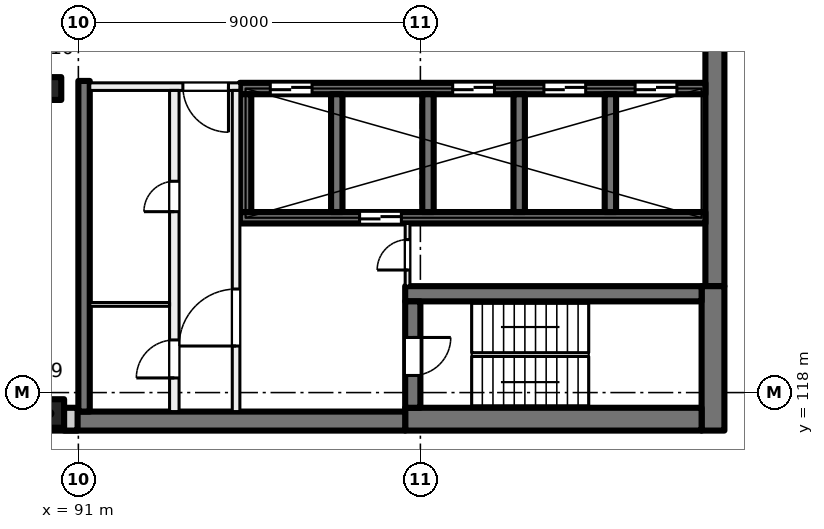
"""IFC4 building model, lengths in metres.
Left out: names, types, materials, properties, quantities, classifications, styles, units other than length and angle.
Written with IfcOpenShell. Run it as: python <this file> out.ifc"""

import sys

from ifc_helpers import new_model, si_unit, direction, frame, frame_2d, origin, origin_2d, place, context, subcontext, project, spatial, rectangle, extrude, element, fill, save


model = new_model("IFC4")
c1 = context("Model", 3, precision=1e-05, world=origin(), true_north=direction((0.0, 1.0)))
c2 = subcontext(c1, "Body", "Model", "MODEL_VIEW")
j1 = project(units=[si_unit("LENGTHUNIT", "METRE"), si_unit("PLANEANGLEUNIT", "RADIAN")], contexts=[c1])
p1 = place(None, origin())
s1 = spatial("IfcSite", under=j1, at=p1, CompositionType="ELEMENT")
p2 = place(p1, origin())
s2 = spatial("IfcBuilding", under=s1, at=p2, CompositionType="ELEMENT")
p3 = place(p2, frame((0.0, 0.0, 212.0)))
s3 = spatial("IfcBuildingStorey", under=s2, at=p3, CompositionType="ELEMENT", Elevation=212.0)
p4 = place(p3, frame((90.25, 126.0, 0.0), z_axis=(0.0, 0.0, 1.0), x_axis=(1.0, 0.0, 0.0)))
e1 = element("IfcColumn", 1, at=p4, inside=s3, PredefinedType="COLUMN", context=c2, shape_type="SweptSolid", body=[
    extrude(rectangle(XDim=0.6, YDim=0.6, at=origin_2d()), origin(), (0.0, 0.0, 1.0), 4.0),
])
p5 = place(p3, frame((90.25, 117.45, 0.0), z_axis=(0.0, 0.0, 1.0), x_axis=(1.0, 0.0, 0.0)))
e2 = element("IfcColumn", 2, at=p5, inside=s3, PredefinedType="COLUMN", context=c2, shape_type="SweptSolid", body=[
    extrude(rectangle(XDim=0.75, YDim=0.75, at=origin_2d()), origin(), (0.0, 0.0, 1.0), 4.0),
])
p6 = place(p3, frame((107.75, 135.2, 0.0), z_axis=(0.0, 0.0, 1.0), x_axis=(0.0, -1.0, 0.0)))
e3 = element("IfcWall", 3, at=p6, inside=s3, PredefinedType="SHEAR", context=c2, shape_type="SweptSolid", body=[
    extrude(rectangle(XDim=14.4, YDim=0.5, at=frame_2d((7.2, 0.0))), origin(), (0.0, 0.0, 1.0), 4.0),
])
p7 = place(p3, frame((107.7, 120.8, 0.0), z_axis=(0.0, 0.0, 1.0), x_axis=(0.0, -1.0, 0.0)))
e4 = element("IfcWall", 4, at=p7, inside=s3, PredefinedType="SHEAR", context=c2, shape_type="SweptSolid", body=[
    extrude(rectangle(XDim=3.8, YDim=0.6, at=frame_2d((1.9, 0.0))), origin(), (0.0, 0.0, 1.0), 4.0),
])
p8 = place(p3, frame((107.4, 117.3, 0.0), z_axis=(0.0, 0.0, 1.0), x_axis=(-1.0, 0.0, 0.0)))
e5 = element("IfcWall", 5, at=p8, inside=s3, PredefinedType="SHEAR", context=c2, shape_type="SweptSolid", body=[
    extrude(rectangle(XDim=7.8, YDim=0.6, at=frame_2d((3.9, 0.0))), origin(), (0.0, 0.0, 1.0), 4.0),
])
p9 = place(p3, frame((99.6, 117.25, 0.0), z_axis=(0.0, 0.0, 1.0), x_axis=(-1.0, 0.0, 0.0)))
e6 = element("IfcWall", 6, at=p9, inside=s3, PredefinedType="SHEAR", context=c2, shape_type="SweptSolid", body=[
    extrude(rectangle(XDim=8.975, YDim=0.5, at=frame_2d((4.488, 0.0))), origin(), (0.0, 0.0, 1.0), 4.0),
])
p10 = place(p3, frame((107.4, 120.6, 0.0), z_axis=(0.0, 0.0, 1.0), x_axis=(-1.0, 0.0, 0.0)))
e7 = element("IfcWall", 7, at=p10, inside=s3, PredefinedType="SHEAR", context=c2, shape_type="SweptSolid", body=[
    extrude(rectangle(XDim=7.8, YDim=0.4, at=frame_2d((3.9, 0.0))), origin(), (0.0, 0.0, 1.0), 4.0),
])
p11 = place(p3, frame((99.8, 120.4, 0.0), z_axis=(0.0, 0.0, 1.0), x_axis=(0.0, -1.0, 0.0)))
e8 = element("IfcWall", 8, at=p11, inside=s3, PredefinedType="SHEAR", context=c2, shape_type="SweptSolid", body=[
    extrude(rectangle(XDim=2.8, YDim=0.4, at=frame_2d((1.4, 0.0))), origin(), (0.0, 0.0, 1.0), 4.0),
])
p12 = place(p11, frame((0.95, 0.0, 0.0)))
e9 = element("IfcOpeningElement", 9, at=p12, cuts=e8, PredefinedType="OPENING", context=c2, shape_type="SweptSolid", body=[
    extrude(rectangle(XDim=1.0, YDim=2.1, at=frame_2d((0.5, 1.05))), frame((0.0, 0.21, 0.0), z_axis=(0.0, -1.0, 0.0), x_axis=(1.0, 0.0, 0.0)), (0.0, 0.0, 1.0), 0.42),
])
p13 = place(p3, frame((107.5, 126.0, 0.0), z_axis=(0.0, 0.0, 1.0), x_axis=(-1.0, 0.0, 0.0)))
e10 = element("IfcWall", 10, at=p13, inside=s3, PredefinedType="SHEAR", context=c2, shape_type="SweptSolid", body=[
    extrude(rectangle(XDim=12.25, YDim=0.3, at=frame_2d((6.125, 0.0))), origin(), (0.0, 0.0, 1.0), 4.0),
])
p14 = place(p13, frame((0.75, 0.0, 0.0)))
e11 = element("IfcOpeningElement", 11, at=p14, cuts=e10, PredefinedType="OPENING", context=c2, shape_type="SweptSolid", body=[
    extrude(rectangle(XDim=1.1, YDim=2.1, at=frame_2d((0.55, 1.05))), frame((0.0, 0.16, 0.0), z_axis=(0.0, -1.0, 0.0), x_axis=(1.0, 0.0, 0.0)), (0.0, 0.0, 1.0), 0.32),
])
p15 = place(p13, frame((3.15, 0.0, 0.0)))
e12 = element("IfcOpeningElement", 12, at=p15, cuts=e10, PredefinedType="OPENING", context=c2, shape_type="SweptSolid", body=[
    extrude(rectangle(XDim=1.1, YDim=2.1, at=frame_2d((0.55, 1.05))), frame((0.0, 0.16, 0.0), z_axis=(0.0, -1.0, 0.0), x_axis=(1.0, 0.0, 0.0)), (0.0, 0.0, 1.0), 0.32),
])
p16 = place(p13, frame((5.55, 0.0, 0.0)))
e13 = element("IfcOpeningElement", 13, at=p16, cuts=e10, PredefinedType="OPENING", context=c2, shape_type="SweptSolid", body=[
    extrude(rectangle(XDim=1.1, YDim=2.1, at=frame_2d((0.55, 1.05))), frame((0.0, 0.16, 0.0), z_axis=(0.0, -1.0, 0.0), x_axis=(1.0, 0.0, 0.0)), (0.0, 0.0, 1.0), 0.32),
])
p17 = place(p13, frame((10.35, 0.0, 0.0)))
e14 = element("IfcOpeningElement", 14, at=p17, cuts=e10, PredefinedType="OPENING", context=c2, shape_type="SweptSolid", body=[
    extrude(rectangle(XDim=1.1, YDim=2.1, at=frame_2d((0.55, 1.05))), frame((0.0, 0.16, 0.0), z_axis=(0.0, -1.0, 0.0), x_axis=(1.0, 0.0, 0.0)), (0.0, 0.0, 1.0), 0.32),
])
p18 = place(p3, frame((107.5, 122.6, 0.0), z_axis=(0.0, 0.0, 1.0), x_axis=(-1.0, 0.0, 0.0)))
e15 = element("IfcWall", 15, at=p18, inside=s3, PredefinedType="SHEAR", context=c2, shape_type="SweptSolid", body=[
    extrude(rectangle(XDim=12.25, YDim=0.3, at=frame_2d((6.125, 0.0))), origin(), (0.0, 0.0, 1.0), 4.0),
])
p19 = place(p18, frame((8.0, 0.0, 0.0)))
e16 = element("IfcOpeningElement", 16, at=p19, cuts=e15, PredefinedType="OPENING", context=c2, shape_type="SweptSolid", body=[
    extrude(rectangle(XDim=1.1, YDim=2.1, at=frame_2d((0.55, 1.05))), frame((0.0, 0.16, 0.0), z_axis=(0.0, -1.0, 0.0), x_axis=(1.0, 0.0, 0.0)), (0.0, 0.0, 1.0), 0.32),
])
for number, where, z_axis, x_axis in (
    (17, (105.0, 125.85, 0.0), (0.0, 0.0, 1.0), (0.0, -1.0, 0.0)),
    (18, (102.6, 125.85, 0.0), (0.0, 0.0, 1.0), (0.0, -1.0, 0.0)),
    (19, (100.2, 125.85, 0.0), (0.0, 0.0, 1.0), (0.0, -1.0, 0.0)),
    (20, (97.8, 125.85, 0.0), (0.0, 0.0, 1.0), (0.0, -1.0, 0.0)),
    (21, (95.4, 125.85, 0.0), (0.0, 0.0, 1.0), (0.0, -1.0, 0.0)),
):
    element("IfcWall", number, at=place(p3, frame(where, z_axis=z_axis, x_axis=x_axis)), inside=s3, PredefinedType="SHEAR", context=c2, shape_type="SweptSolid", body=[
        extrude(rectangle(XDim=3.1, YDim=0.3, at=frame_2d((1.55, 0.0))), origin(), (0.0, 0.0, 1.0), 4.0),
    ])
p20 = place(p3, frame((91.15, 126.2, 0.0), z_axis=(0.0, 0.0, 1.0), x_axis=(0.0, -1.0, 0.0)))
e22 = element("IfcWall", 22, at=p20, inside=s3, PredefinedType="SHEAR", context=c2, shape_type="SweptSolid", body=[
    extrude(rectangle(XDim=8.7, YDim=0.3, at=frame_2d((4.35, 0.0))), origin(), (0.0, 0.0, 1.0), 4.0),
])
p21 = place(p3, frame((90.98, 117.3, 0.0), z_axis=(0.0, 0.0, 1.0), x_axis=(-1.0, 0.0, 0.0)))
e23 = element("IfcWall", 23, at=p21, inside=s3, PredefinedType="SOLIDWALL", context=c2, shape_type="SweptSolid", body=[
    extrude(rectangle(XDim=32.845, YDim=0.6, at=frame_2d((16.422, 0.0))), origin(), (0.0, 0.0, 1.0), 3.625),
])
p22 = place(p21, frame((1.48, 0.0, 0.9)))
e24 = element("IfcOpeningElement", 24, at=p22, cuts=e23, PredefinedType="OPENING", context=c2, shape_type="SweptSolid", body=[
    extrude(rectangle(XDim=3.0, YDim=2.4, at=frame_2d((1.5, 1.2))), frame((0.0, 0.31, 0.0), z_axis=(0.0, -1.0, 0.0), x_axis=(1.0, 0.0, 0.0)), (0.0, 0.0, 1.0), 0.62),
])
p23 = place(p21, frame((5.98, 0.0, 0.9)))
e25 = element("IfcOpeningElement", 25, at=p23, cuts=e23, PredefinedType="OPENING", context=c2, shape_type="SweptSolid", body=[
    extrude(rectangle(XDim=3.0, YDim=2.4, at=frame_2d((1.5, 1.2))), frame((0.0, 0.31, 0.0), z_axis=(0.0, -1.0, 0.0), x_axis=(1.0, 0.0, 0.0)), (0.0, 0.0, 1.0), 0.62),
])
p24 = place(p21, frame((10.48, 0.0, 0.9)))
e26 = element("IfcOpeningElement", 26, at=p24, cuts=e23, PredefinedType="OPENING", context=c2, shape_type="SweptSolid", body=[
    extrude(rectangle(XDim=3.0, YDim=2.4, at=frame_2d((1.5, 1.2))), frame((0.0, 0.31, 0.0), z_axis=(0.0, -1.0, 0.0), x_axis=(1.0, 0.0, 0.0)), (0.0, 0.0, 1.0), 0.62),
])
p25 = place(p21, frame((14.98, 0.0, 0.9)))
e27 = element("IfcOpeningElement", 27, at=p25, cuts=e23, PredefinedType="OPENING", context=c2, shape_type="SweptSolid", body=[
    extrude(rectangle(XDim=3.0, YDim=2.4, at=frame_2d((1.5, 1.2))), frame((0.0, 0.31, 0.0), z_axis=(0.0, -1.0, 0.0), x_axis=(1.0, 0.0, 0.0)), (0.0, 0.0, 1.0), 0.62),
])
p26 = place(p21, frame((19.48, 0.0, 0.9)))
e28 = element("IfcOpeningElement", 28, at=p26, cuts=e23, PredefinedType="OPENING", context=c2, shape_type="SweptSolid", body=[
    extrude(rectangle(XDim=3.0, YDim=2.4, at=frame_2d((1.5, 1.2))), frame((0.0, 0.31, 0.0), z_axis=(0.0, -1.0, 0.0), x_axis=(1.0, 0.0, 0.0)), (0.0, 0.0, 1.0), 0.62),
])
p27 = place(p21, frame((23.98, 0.0, 0.9)))
e29 = element("IfcOpeningElement", 29, at=p27, cuts=e23, PredefinedType="OPENING", context=c2, shape_type="SweptSolid", body=[
    extrude(rectangle(XDim=3.0, YDim=2.4, at=frame_2d((1.5, 1.2))), frame((0.0, 0.31, 0.0), z_axis=(0.0, -1.0, 0.0), x_axis=(1.0, 0.0, 0.0)), (0.0, 0.0, 1.0), 0.62),
])
p28 = place(p21, frame((28.48, 0.0, 0.9)))
e30 = element("IfcOpeningElement", 30, at=p28, cuts=e23, PredefinedType="OPENING", context=c2, shape_type="SweptSolid", body=[
    extrude(rectangle(XDim=3.0, YDim=2.4, at=frame_2d((1.5, 1.2))), frame((0.0, 0.31, 0.0), z_axis=(0.0, -1.0, 0.0), x_axis=(1.0, 0.0, 0.0)), (0.0, 0.0, 1.0), 0.62),
])
p29 = place(p3, frame((95.25, 126.05, 0.0), z_axis=(0.0, 0.0, 1.0), x_axis=(-1.0, 0.0, 0.0)))
e31 = element("IfcWall", 31, at=p29, inside=s3, PredefinedType="PARTITIONING", context=c2, shape_type="SweptSolid", body=[
    extrude(rectangle(XDim=3.95, YDim=0.2, at=frame_2d((1.975, 0.0))), origin(), (0.0, 0.0, 1.0), 3.625),
])
p30 = place(p29, frame((0.3, 0.0, 0.0)))
e32 = element("IfcOpeningElement", 32, at=p30, cuts=e31, PredefinedType="OPENING", context=c2, shape_type="SweptSolid", body=[
    extrude(rectangle(XDim=1.2, YDim=2.1, at=frame_2d((0.6, 1.05))), frame((0.0, 0.11, 0.0), z_axis=(0.0, -1.0, 0.0), x_axis=(1.0, 0.0, 0.0)), (0.0, 0.0, 1.0), 0.22),
])
p31 = place(p3, frame((95.15, 117.5, 0.0), z_axis=(0.0, 0.0, 1.0), x_axis=(0.0, 1.0, 0.0)))
e33 = element("IfcWall", 33, at=p31, inside=s3, PredefinedType="PARTITIONING", context=c2, shape_type="SweptSolid", body=[
    extrude(rectangle(XDim=8.45, YDim=0.2, at=frame_2d((4.225, 0.0))), origin(), (0.0, 0.0, 1.0), 3.625),
])
p32 = place(p31, frame((1.725, 0.0, 0.0)))
e34 = element("IfcOpeningElement", 34, at=p32, cuts=e33, PredefinedType="OPENING", context=c2, shape_type="SweptSolid", body=[
    extrude(rectangle(XDim=1.5, YDim=2.1, at=frame_2d((0.75, 1.05))), frame((0.0, 0.11, 0.0), z_axis=(0.0, -1.0, 0.0), x_axis=(1.0, 0.0, 0.0)), (0.0, 0.0, 1.0), 0.22),
])
p33 = place(p3, frame((93.525, 117.5, 0.0), z_axis=(0.0, 0.0, 1.0), x_axis=(0.0, 1.0, 0.0)))
e35 = element("IfcWall", 35, at=p33, inside=s3, PredefinedType="PARTITIONING", context=c2, shape_type="SweptSolid", body=[
    extrude(rectangle(XDim=8.45, YDim=0.25, at=frame_2d((4.225, 0.0))), origin(), (0.0, 0.0, 1.0), 3.625),
])
p34 = place(p33, frame((5.26, 0.0, 0.0)))
e36 = element("IfcOpeningElement", 36, at=p34, cuts=e35, PredefinedType="OPENING", context=c2, shape_type="SweptSolid", body=[
    extrude(rectangle(XDim=0.8, YDim=2.1, at=frame_2d((0.4, 1.05))), frame((0.0, 0.135, 0.0), z_axis=(0.0, -1.0, 0.0), x_axis=(1.0, 0.0, 0.0)), (0.0, 0.0, 1.0), 0.27),
])
p35 = place(p33, frame((0.885, 0.0, 0.0)))
e37 = element("IfcOpeningElement", 37, at=p35, cuts=e35, PredefinedType="OPENING", context=c2, shape_type="SweptSolid", body=[
    extrude(rectangle(XDim=1.0, YDim=2.1, at=frame_2d((0.5, 1.05))), frame((0.0, 0.135, 0.0), z_axis=(0.0, -1.0, 0.0), x_axis=(1.0, 0.0, 0.0)), (0.0, 0.0, 1.0), 0.27),
])
p36 = place(p3, frame((99.663, 120.8, 0.0), z_axis=(0.0, 0.0, 1.0), x_axis=(0.0, 1.0, 0.0)))
e38 = element("IfcWall", 38, at=p36, inside=s3, PredefinedType="PARTITIONING", context=c2, shape_type="SweptSolid", body=[
    extrude(rectangle(XDim=1.65, YDim=0.125, at=frame_2d((0.825, 0.0))), origin(), (0.0, 0.0, 1.0), 3.625),
])
p37 = place(p36, frame((0.425, 0.0, 0.0)))
e39 = element("IfcOpeningElement", 39, at=p37, cuts=e38, PredefinedType="OPENING", context=c2, shape_type="SweptSolid", body=[
    extrude(rectangle(XDim=0.8, YDim=2.1, at=frame_2d((0.4, 1.05))), frame((0.0, 0.073, 0.0), z_axis=(0.0, -1.0, 0.0), x_axis=(1.0, 0.0, 0.0)), (0.0, 0.0, 1.0), 0.145),
])
p38 = place(p3, frame((93.4, 120.32, 0.0), z_axis=(0.0, 0.0, 1.0), x_axis=(-1.0, 0.0, 0.0)))
e40 = element("IfcWall", 40, at=p38, inside=s3, PredefinedType="PARTITIONING", context=c2, shape_type="SweptSolid", body=[
    extrude(rectangle(XDim=2.1, YDim=0.1, at=frame_2d((1.05, 0.0))), origin(), (0.0, 0.0, 1.0), 3.625),
])
p39 = place(p14, origin())
e41 = element("IfcDoor", 41, at=p39, inside=s3, OperationType="DOUBLE_DOOR_SLIDING", PredefinedType="DOOR", context=c2, shape_type="SweptSolid", body=[
    extrude(rectangle(XDim=1.1, YDim=2.1, at=frame_2d((0.55, 1.05))), frame((0.0, 0.025, 0.0), z_axis=(0.0, -1.0, 0.0), x_axis=(1.0, 0.0, 0.0)), (0.0, 0.0, 1.0), 0.05),
])
fill(e11, e41)
p40 = place(p15, origin())
e42 = element("IfcDoor", 42, at=p40, inside=s3, OperationType="DOUBLE_DOOR_SLIDING", PredefinedType="DOOR", context=c2, shape_type="SweptSolid", body=[
    extrude(rectangle(XDim=1.1, YDim=2.1, at=frame_2d((0.55, 1.05))), frame((0.0, 0.025, 0.0), z_axis=(0.0, -1.0, 0.0), x_axis=(1.0, 0.0, 0.0)), (0.0, 0.0, 1.0), 0.05),
])
fill(e12, e42)
p41 = place(p16, origin())
e43 = element("IfcDoor", 43, at=p41, inside=s3, OperationType="DOUBLE_DOOR_SLIDING", PredefinedType="DOOR", context=c2, shape_type="SweptSolid", body=[
    extrude(rectangle(XDim=1.1, YDim=2.1, at=frame_2d((0.55, 1.05))), frame((0.0, 0.025, 0.0), z_axis=(0.0, -1.0, 0.0), x_axis=(1.0, 0.0, 0.0)), (0.0, 0.0, 1.0), 0.05),
])
fill(e13, e43)
p42 = place(p17, origin())
e44 = element("IfcDoor", 44, at=p42, inside=s3, OperationType="DOUBLE_DOOR_SLIDING", PredefinedType="DOOR", context=c2, shape_type="SweptSolid", body=[
    extrude(rectangle(XDim=1.1, YDim=2.1, at=frame_2d((0.55, 1.05))), frame((0.0, 0.025, 0.0), z_axis=(0.0, -1.0, 0.0), x_axis=(1.0, 0.0, 0.0)), (0.0, 0.0, 1.0), 0.05),
])
fill(e14, e44)
p43 = place(p30, origin())
e45 = element("IfcDoor", 45, at=p43, inside=s3, OperationType="DOUBLE_DOOR_SINGLE_SWING", PredefinedType="DOOR", context=c2, shape_type="SweptSolid", body=[
    extrude(rectangle(XDim=1.2, YDim=2.1, at=frame_2d((0.6, 1.05))), frame((0.0, 0.025, 0.0), z_axis=(0.0, -1.0, 0.0), x_axis=(1.0, 0.0, 0.0)), (0.0, 0.0, 1.0), 0.05),
])
fill(e32, e45)
p44 = place(p32, origin())
e46 = element("IfcDoor", 46, at=p44, inside=s3, OperationType="DOUBLE_DOOR_SINGLE_SWING", PredefinedType="DOOR", context=c2, shape_type="SweptSolid", body=[
    extrude(rectangle(XDim=1.5, YDim=2.1, at=frame_2d((0.75, 1.05))), frame((0.0, 0.025, 0.0), z_axis=(0.0, -1.0, 0.0), x_axis=(1.0, 0.0, 0.0)), (0.0, 0.0, 1.0), 0.05),
])
fill(e34, e46)
p45 = place(p12, origin())
e47 = element("IfcDoor", 47, at=p45, inside=s3, OperationType="SINGLE_SWING_LEFT", PredefinedType="DOOR", context=c2, shape_type="SweptSolid", body=[
    extrude(rectangle(XDim=1.0, YDim=2.1, at=frame_2d((0.5, 1.05))), frame((0.0, 0.025, 0.0), z_axis=(0.0, -1.0, 0.0), x_axis=(1.0, 0.0, 0.0)), (0.0, 0.0, 1.0), 0.05),
])
fill(e9, e47)
p46 = place(p37, origin())
e48 = element("IfcDoor", 48, at=p46, inside=s3, OperationType="SINGLE_SWING_RIGHT", PredefinedType="DOOR", context=c2, shape_type="SweptSolid", body=[
    extrude(rectangle(XDim=0.8, YDim=2.1, at=frame_2d((0.4, 1.05))), frame((0.0, 0.025, 0.0), z_axis=(0.0, -1.0, 0.0), x_axis=(1.0, 0.0, 0.0)), (0.0, 0.0, 1.0), 0.05),
])
fill(e39, e48)
p47 = place(p34, origin())
e49 = element("IfcDoor", 49, at=p47, inside=s3, OperationType="SINGLE_SWING_LEFT", PredefinedType="DOOR", context=c2, shape_type="SweptSolid", body=[
    extrude(rectangle(XDim=0.8, YDim=2.1, at=frame_2d((0.4, 1.05))), frame((0.0, 0.025, 0.0), z_axis=(0.0, -1.0, 0.0), x_axis=(1.0, 0.0, 0.0)), (0.0, 0.0, 1.0), 0.05),
])
fill(e36, e49)
p48 = place(p35, origin())
e50 = element("IfcDoor", 50, at=p48, inside=s3, OperationType="SINGLE_SWING_RIGHT", PredefinedType="DOOR", context=c2, shape_type="SweptSolid", body=[
    extrude(rectangle(XDim=1.0, YDim=2.1, at=frame_2d((0.5, 1.05))), frame((0.0, 0.025, 0.0), z_axis=(0.0, -1.0, 0.0), x_axis=(1.0, 0.0, 0.0)), (0.0, 0.0, 1.0), 0.05),
])
fill(e37, e50)
p49 = place(p19, origin())
e51 = element("IfcDoor", 51, at=p49, inside=s3, OperationType="DOUBLE_DOOR_SLIDING", PredefinedType="DOOR", context=c2, shape_type="SweptSolid", body=[
    extrude(rectangle(XDim=1.1, YDim=2.1, at=frame_2d((0.55, 1.05))), frame((0.0, 0.025, 0.0), z_axis=(0.0, -1.0, 0.0), x_axis=(1.0, 0.0, 0.0)), (0.0, 0.0, 1.0), 0.05),
])
fill(e16, e51)
save(model, sys.argv[1])
